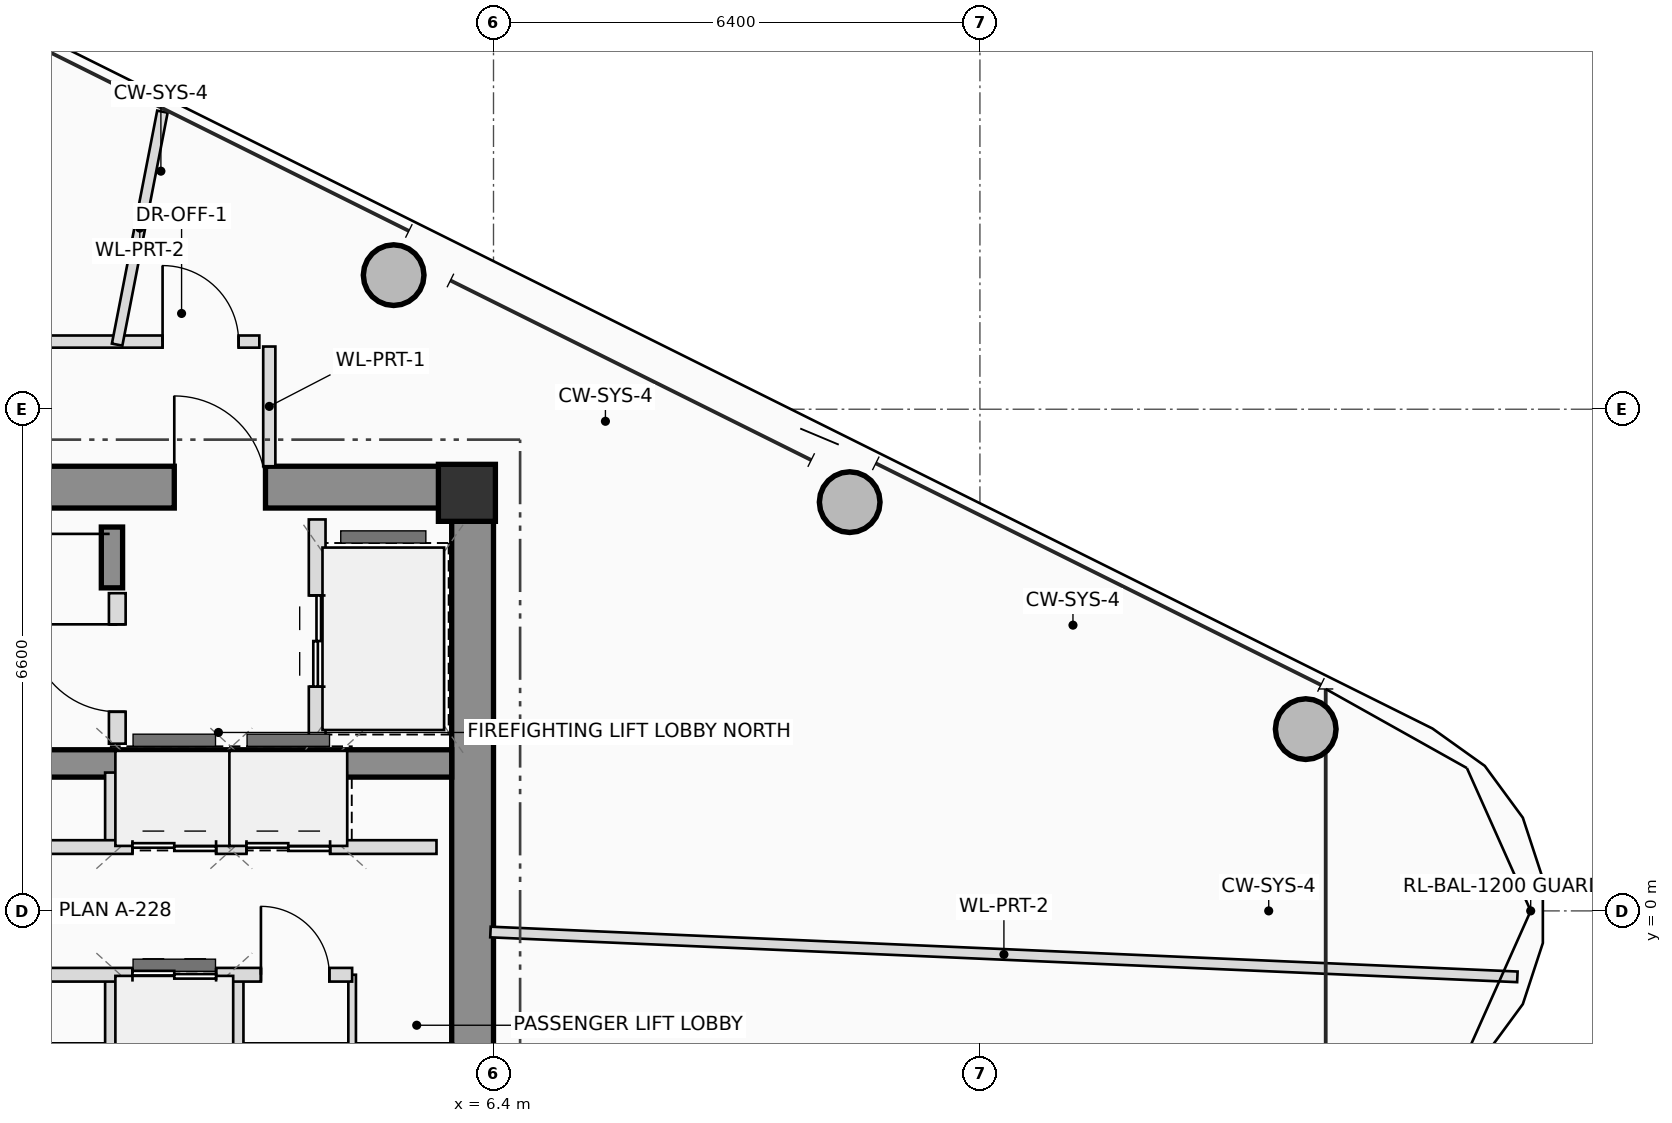
"""IFC4 building model, lengths in metres.
Left out: names, types, materials, properties, quantities, classifications, styles, units other than length and angle.
Written with IfcOpenShell. Run it as: python <this file> out.ifc"""

import sys

from ifc_helpers import new_model, si_unit, direction, frame, frame_2d, origin, origin_2d, place, context, subcontext, project, spatial, rectangle, hollow_circle, extrude, source, transform, mapped, element, fill, save


model = new_model("IFC4")
c1 = context("Model", 3, precision=1e-05, world=origin(), true_north=direction((0.0, 1.0)))
c2 = subcontext(c1, "Body", "Model", "MODEL_VIEW")
j1 = project(units=[si_unit("LENGTHUNIT", "METRE"), si_unit("PLANEANGLEUNIT", "RADIAN")], contexts=[c1])
p1 = place(None, origin())
s1 = spatial("IfcSite", under=j1, at=p1, CompositionType="ELEMENT")
p2 = place(p1, origin())
s2 = spatial("IfcBuilding", under=s1, at=p2, CompositionType="ELEMENT")
p3 = place(p2, frame((0.0, 0.0, 314.0)))
s3 = spatial("IfcBuildingStorey", under=s2, at=p3, CompositionType="ELEMENT", Elevation=314.0)
m1 = source(origin(), c2, "Body", "SweptSolid", [
    extrude(rectangle(XDim=0.75, YDim=0.75, at=origin_2d()), origin(), (0.0, 0.0, 1.0), 3.45),
])
p4 = place(p3, frame((6.05, 5.5, 0.0), z_axis=(0.0, 0.0, 1.0), x_axis=(1.0, 0.0, 0.0)))
e1 = element("IfcColumn", 1, at=p4, inside=s3, PredefinedType="COLUMN", context=c2, shape_type="MappedRepresentation", body=[
    mapped(m1, transform((0.0, 0.0, 0.0), scale=1.0)),
])
p5 = place(p3, frame((-6.4, 5.575, 0.0), z_axis=(0.0, 0.0, 1.0), x_axis=(1.0, 0.0, 0.0)))
e2 = element("IfcWall", 2, at=p5, inside=s3, PredefinedType="SHEAR", context=c2, shape_type="SweptSolid", body=[
    extrude(rectangle(XDim=12.8, YDim=0.55, at=frame_2d((6.4, 0.0))), origin(), (0.0, 0.0, 1.0), 3.45),
])
p6 = place(p5, frame((8.6, 0.0, 0.0)))
e3 = element("IfcOpeningElement", 3, at=p6, cuts=e2, PredefinedType="OPENING", context=c2, shape_type="SweptSolid", body=[
    extrude(rectangle(XDim=1.2, YDim=2.2, at=frame_2d((0.6, 1.1))), frame((0.0, 0.285, 0.0), z_axis=(0.0, -1.0, 0.0), x_axis=(1.0, 0.0, 0.0)), (0.0, 0.0, 1.0), 0.57),
])
p7 = place(p3, frame((6.125, -5.3, 0.0), z_axis=(0.0, 0.0, 1.0), x_axis=(0.0, 1.0, 0.0)))
e4 = element("IfcWall", 4, at=p7, inside=s3, PredefinedType="SHEAR", context=c2, shape_type="SweptSolid", body=[
    extrude(rectangle(XDim=10.6, YDim=0.55, at=frame_2d((5.3, 0.0))), origin(), (0.0, 0.0, 1.0), 3.45),
])
p8 = place(p3, frame((-5.85, 1.94, 0.0), z_axis=(0.0, 0.0, 1.0), x_axis=(1.0, 0.0, 0.0)))
e5 = element("IfcWall", 5, at=p8, inside=s3, PredefinedType="SHEAR", context=c2, shape_type="SweptSolid", body=[
    extrude(rectangle(XDim=11.7, YDim=0.36, at=frame_2d((5.85, 0.0))), origin(), (0.0, 0.0, 1.0), 3.45),
])
p9 = place(p3, frame((1.38, 4.25, 0.0), z_axis=(0.0, 0.0, 1.0), x_axis=(0.0, 1.0, 0.0)))
e6 = element("IfcWall", 6, at=p9, inside=s3, PredefinedType="SHEAR", context=c2, shape_type="SweptSolid", body=[
    extrude(rectangle(XDim=0.8, YDim=0.28, at=frame_2d((0.4, 0.0))), origin(), (0.0, 0.0, 1.0), 3.45),
])
m2 = source(origin(), c2, "Body", "SweptSolid", [
    extrude(hollow_circle(Radius=0.4, WallThickness=0.028, at=origin_2d()), origin(), (0.0, 0.0, 1.0), 3.19),
])
for number, where, z_axis, x_axis in (
    (7, (17.087, 2.392, 0.0), (0.0, 0.0, 1.0), (1.0, 0.0, 0.0)),
    (8, (11.086, 5.378, 0.0), (0.0, 0.0, 1.0), (1.0, 0.0, 0.0)),
    (9, (5.086, 8.364, 0.0), (0.0, 0.0, 1.0), (1.0, 0.0, 0.0)),
):
    element("IfcColumn", number, at=place(p3, frame(where, z_axis=z_axis, x_axis=x_axis)), inside=s3, PredefinedType="COLUMN", context=c2, shape_type="MappedRepresentation", body=[
        mapped(m2, transform((0.0, 0.0, 0.0), scale=1.0)),
    ])
p10 = place(p3, frame((1.45, 2.2, 0.0), z_axis=(0.0, 0.0, 1.0), x_axis=(0.0, 1.0, 0.0)))
e10 = element("IfcWall", 10, at=p10, inside=s3, PredefinedType="PLUMBINGWALL", context=c2, shape_type="SweptSolid", body=[
    extrude(rectangle(XDim=1.98, YDim=0.22, at=frame_2d((0.99, 0.0))), origin(), (0.0, 0.0, 1.0), 3.17),
])
p11 = place(p10, frame((0.42, 0.0, 0.0)))
e11 = element("IfcOpeningElement", 11, at=p11, cuts=e10, PredefinedType="OPENING", context=c2, shape_type="SweptSolid", body=[
    extrude(rectangle(XDim=1.15, YDim=2.15, at=frame_2d((0.575, 1.075))), frame((0.0, 0.12, 0.0), z_axis=(0.0, -1.0, 0.0), x_axis=(1.0, 0.0, 0.0)), (0.0, 0.0, 1.0), 0.24),
])
p12 = place(p3, frame((4.08, 2.2, 0.0), z_axis=(0.0, 0.0, 1.0), x_axis=(0.0, 1.0, 0.0)))
e12 = element("IfcWall", 12, at=p12, inside=s3, PredefinedType="PLUMBINGWALL", context=c2, shape_type="SweptSolid", body=[
    extrude(rectangle(XDim=2.95, YDim=0.22, at=frame_2d((1.475, 0.0))), origin(), (0.0, 0.0, 1.0), 3.17),
])
p13 = place(p12, frame((0.75, 0.0, 0.0)))
e13 = element("IfcOpeningElement", 13, at=p13, cuts=e12, PredefinedType="OPENING", context=c2, shape_type="SweptSolid", body=[
    extrude(rectangle(XDim=1.2, YDim=2.25, at=frame_2d((0.6, 1.125))), frame((0.0, 0.12, 0.0), z_axis=(0.0, -1.0, 0.0), x_axis=(1.0, 0.0, 0.0)), (0.0, 0.0, 1.0), 0.24),
])
for number, where, z_axis, x_axis in (
    (14, (1.38, 0.84, 0.0), (0.0, 0.0, 1.0), (0.0, 1.0, 0.0)),
    (15, (1.38, -1.82, 0.0), (0.0, 0.0, 1.0), (0.0, 1.0, 0.0)),
    (16, (3.02, 0.84, 0.0), (0.0, 0.0, 1.0), (0.0, 1.0, 0.0)),
    (17, (4.38, 0.84, 0.0), (0.0, 0.0, 1.0), (0.0, 1.0, 0.0)),
    (18, (3.02, -1.82, 0.0), (0.0, 0.0, 1.0), (0.0, 1.0, 0.0)),
):
    element("IfcWall", number, at=place(p3, frame(where, z_axis=z_axis, x_axis=x_axis)), inside=s3, PredefinedType="PLUMBINGWALL", context=c2, shape_type="SweptSolid", body=[
        extrude(rectangle(XDim=0.98, YDim=0.18, at=frame_2d((0.49, 0.0))), origin(), (0.0, 0.0, 1.0), 3.17),
    ])
p14 = place(p3, frame((4.54, -1.82, 0.0), z_axis=(0.0, 0.0, 1.0), x_axis=(0.0, 1.0, 0.0)))
e19 = element("IfcWall", 19, at=p14, inside=s3, PredefinedType="PARTITIONING", context=c2, shape_type="SweptSolid", body=[
    extrude(rectangle(XDim=0.98, YDim=0.1, at=frame_2d((0.49, 0.0))), origin(), (0.0, 0.0, 1.0), 3.17),
])
p15 = place(p3, frame((-5.68, 0.84, 0.0), z_axis=(0.0, 0.0, 1.0), x_axis=(1.0, 0.0, 0.0)))
e20 = element("IfcWall", 20, at=p15, inside=s3, PredefinedType="PLUMBINGWALL", context=c2, shape_type="SweptSolid", body=[
    extrude(rectangle(XDim=11.33, YDim=0.18, at=frame_2d((5.665, 0.0))), origin(), (0.0, 0.0, 1.0), 3.17),
])
p16 = place(p15, frame((3.13, 0.0, 0.0)))
e21 = element("IfcOpeningElement", 21, at=p16, cuts=e20, PredefinedType="OPENING", context=c2, shape_type="SweptSolid", body=[
    extrude(rectangle(XDim=0.9, YDim=2.05, at=frame_2d((0.45, 1.025))), frame((0.0, 0.1, 0.0), z_axis=(0.0, -1.0, 0.0), x_axis=(1.0, 0.0, 0.0)), (0.0, 0.0, 1.0), 0.2),
])
p17 = place(p15, frame((7.33, 0.0, 0.0)))
e22 = element("IfcOpeningElement", 22, at=p17, cuts=e20, PredefinedType="OPENING", context=c2, shape_type="SweptSolid", body=[
    extrude(rectangle(XDim=1.1, YDim=2.2, at=frame_2d((0.55, 1.1))), frame((0.0, 0.1, 0.0), z_axis=(0.0, -1.0, 0.0), x_axis=(1.0, 0.0, 0.0)), (0.0, 0.0, 1.0), 0.2),
])
p18 = place(p15, frame((8.83, 0.0, 0.0)))
e23 = element("IfcOpeningElement", 23, at=p18, cuts=e20, PredefinedType="OPENING", context=c2, shape_type="SweptSolid", body=[
    extrude(rectangle(XDim=1.1, YDim=2.2, at=frame_2d((0.55, 1.1))), frame((0.0, 0.1, 0.0), z_axis=(0.0, -1.0, 0.0), x_axis=(1.0, 0.0, 0.0)), (0.0, 0.0, 1.0), 0.2),
])
p19 = place(p3, frame((-5.68, -0.84, 0.0), z_axis=(0.0, 0.0, 1.0), x_axis=(1.0, 0.0, 0.0)))
e24 = element("IfcWall", 24, at=p19, inside=s3, PredefinedType="PLUMBINGWALL", context=c2, shape_type="SweptSolid", body=[
    extrude(rectangle(XDim=10.22, YDim=0.18, at=frame_2d((5.11, 0.0))), origin(), (0.0, 0.0, 1.0), 3.17),
])
p20 = place(p19, frame((1.88, 0.0, 0.0)))
e25 = element("IfcOpeningElement", 25, at=p20, cuts=e24, PredefinedType="OPENING", context=c2, shape_type="SweptSolid", body=[
    extrude(rectangle(XDim=0.9, YDim=2.05, at=frame_2d((0.45, 1.025))), frame((0.0, 0.1, 0.0), z_axis=(0.0, -1.0, 0.0), x_axis=(1.0, 0.0, 0.0)), (0.0, 0.0, 1.0), 0.2),
])
p21 = place(p19, frame((5.35, 0.0, 0.0)))
e26 = element("IfcOpeningElement", 26, at=p21, cuts=e24, PredefinedType="OPENING", context=c2, shape_type="SweptSolid", body=[
    extrude(rectangle(XDim=0.9, YDim=2.05, at=frame_2d((0.45, 1.025))), frame((0.0, 0.1, 0.0), z_axis=(0.0, -1.0, 0.0), x_axis=(1.0, 0.0, 0.0)), (0.0, 0.0, 1.0), 0.2),
])
p22 = place(p19, frame((7.33, 0.0, 0.0)))
e27 = element("IfcOpeningElement", 27, at=p22, cuts=e24, PredefinedType="OPENING", context=c2, shape_type="SweptSolid", body=[
    extrude(rectangle(XDim=1.1, YDim=2.2, at=frame_2d((0.55, 1.1))), frame((0.0, 0.1, 0.0), z_axis=(0.0, -1.0, 0.0), x_axis=(1.0, 0.0, 0.0)), (0.0, 0.0, 1.0), 0.2),
])
p23 = place(p19, frame((9.02, 0.0, 0.0)))
e28 = element("IfcOpeningElement", 28, at=p23, cuts=e24, PredefinedType="OPENING", context=c2, shape_type="SweptSolid", body=[
    extrude(rectangle(XDim=0.9, YDim=2.05, at=frame_2d((0.45, 1.025))), frame((0.0, 0.1, 0.0), z_axis=(0.0, -1.0, 0.0), x_axis=(1.0, 0.0, 0.0)), (0.0, 0.0, 1.0), 0.2),
])
p24 = place(p3, frame((-6.36, 7.49, 0.0), z_axis=(0.0, 0.0, 1.0), x_axis=(1.0, 0.0, 0.0)))
e29 = element("IfcWall", 29, at=p24, inside=s3, PredefinedType="PARTITIONING", context=c2, shape_type="SweptSolid", body=[
    extrude(rectangle(XDim=9.679, YDim=0.16, at=frame_2d((4.84, 0.0))), origin(), (0.0, 0.0, 1.0), 2.575),
])
p25 = place(p24, frame((4.367, 0.0, 0.0)))
e30 = element("IfcOpeningElement", 30, at=p25, cuts=e29, PredefinedType="OPENING", context=c2, shape_type="SweptSolid", body=[
    extrude(rectangle(XDim=1.0, YDim=2.25, at=frame_2d((0.5, 1.125))), frame((0.0, 0.09, 0.0), z_axis=(0.0, -1.0, 0.0), x_axis=(1.0, 0.0, 0.0)), (0.0, 0.0, 1.0), 0.18),
])
p26 = place(p24, frame((8.406, 0.0, 0.0)))
e31 = element("IfcOpeningElement", 31, at=p26, cuts=e29, PredefinedType="OPENING", context=c2, shape_type="SweptSolid", body=[
    extrude(rectangle(XDim=1.0, YDim=2.25, at=frame_2d((0.5, 1.125))), frame((0.0, 0.09, 0.0), z_axis=(0.0, -1.0, 0.0), x_axis=(1.0, 0.0, 0.0)), (0.0, 0.0, 1.0), 0.18),
])
p27 = place(p3, frame((3.45, 7.425, 0.0), z_axis=(0.0, 0.0, 1.0), x_axis=(0.0, -1.0, 0.0)))
e32 = element("IfcWall", 32, at=p27, inside=s3, PredefinedType="PARTITIONING", context=c2, shape_type="SweptSolid", body=[
    extrude(rectangle(XDim=1.575, YDim=0.16, at=frame_2d((0.787, 0.0))), origin(), (0.0, 0.0, 1.0), 2.775),
])
p28 = place(p3, frame((6.36, -0.278, 0.0), z_axis=(0.0, 0.0, 1.0), x_axis=(0.999047623791, -0.043633076864, 0.0)))
e33 = element("IfcWall", 33, at=p28, inside=s3, PredefinedType="PARTITIONING", context=c2, shape_type="SweptSolid", body=[
    extrude(rectangle(XDim=13.524, YDim=0.14, at=frame_2d((6.762, 0.0))), origin(), (0.0, 0.0, 1.0), 2.735),
])
p29 = place(p3, frame((1.448, 7.45, 0.0), z_axis=(0.0, 0.0, 1.0), x_axis=(0.190865473384, 0.981616203549, 0.0)))
e34 = element("IfcWall", 34, at=p29, inside=s3, PredefinedType="PARTITIONING", context=c2, shape_type="SweptSolid", body=[
    extrude(rectangle(XDim=3.122, YDim=0.14, at=frame_2d((1.561, 0.0))), origin(), (0.0, 0.0, 1.0), 2.735),
])
p30 = place(p6, origin())
e35 = element("IfcDoor", 35, at=p30, inside=s3, OperationType="SINGLE_SWING_LEFT", PredefinedType="DOOR", context=c2, shape_type="SweptSolid", body=[
    extrude(rectangle(XDim=1.2, YDim=2.2, at=frame_2d((0.6, 1.1))), frame((0.0, 0.025, 0.0), z_axis=(0.0, -1.0, 0.0), x_axis=(1.0, 0.0, 0.0)), (0.0, 0.0, 1.0), 0.05),
])
fill(e3, e35)
p31 = place(p11, origin())
e36 = element("IfcDoor", 36, at=p31, inside=s3, OperationType="SINGLE_SWING_RIGHT", PredefinedType="DOOR", context=c2, shape_type="SweptSolid", body=[
    extrude(rectangle(XDim=1.15, YDim=2.15, at=frame_2d((0.575, 1.075))), frame((0.0, 0.025, 0.0), z_axis=(0.0, -1.0, 0.0), x_axis=(1.0, 0.0, 0.0)), (0.0, 0.0, 1.0), 0.05),
])
fill(e11, e36)
p32 = place(p13, origin())
e37 = element("IfcDoor", 37, at=p32, inside=s3, OperationType="DOUBLE_DOOR_SLIDING", PredefinedType="DOOR", context=c2, shape_type="SweptSolid", body=[
    extrude(rectangle(XDim=1.2, YDim=2.25, at=frame_2d((0.6, 1.125))), frame((0.0, 0.025, 0.0), z_axis=(0.0, -1.0, 0.0), x_axis=(1.0, 0.0, 0.0)), (0.0, 0.0, 1.0), 0.05),
])
fill(e13, e37)
p33 = place(p17, origin())
e38 = element("IfcDoor", 38, at=p33, inside=s3, OperationType="DOUBLE_DOOR_SLIDING", PredefinedType="DOOR", context=c2, shape_type="SweptSolid", body=[
    extrude(rectangle(XDim=1.1, YDim=2.2, at=frame_2d((0.55, 1.1))), frame((0.0, 0.025, 0.0), z_axis=(0.0, -1.0, 0.0), x_axis=(1.0, 0.0, 0.0)), (0.0, 0.0, 1.0), 0.05),
])
fill(e22, e38)
p34 = place(p18, origin())
e39 = element("IfcDoor", 39, at=p34, inside=s3, OperationType="DOUBLE_DOOR_SLIDING", PredefinedType="DOOR", context=c2, shape_type="SweptSolid", body=[
    extrude(rectangle(XDim=1.1, YDim=2.2, at=frame_2d((0.55, 1.1))), frame((0.0, 0.025, 0.0), z_axis=(0.0, -1.0, 0.0), x_axis=(1.0, 0.0, 0.0)), (0.0, 0.0, 1.0), 0.05),
])
fill(e23, e39)
p35 = place(p22, origin())
e40 = element("IfcDoor", 40, at=p35, inside=s3, OperationType="DOUBLE_DOOR_SLIDING", PredefinedType="DOOR", context=c2, shape_type="SweptSolid", body=[
    extrude(rectangle(XDim=1.1, YDim=2.2, at=frame_2d((0.55, 1.1))), frame((0.0, 0.025, 0.0), z_axis=(0.0, -1.0, 0.0), x_axis=(1.0, 0.0, 0.0)), (0.0, 0.0, 1.0), 0.05),
])
fill(e27, e40)
p36 = place(p23, origin())
e41 = element("IfcDoor", 41, at=p36, inside=s3, OperationType="SINGLE_SWING_LEFT", PredefinedType="DOOR", context=c2, shape_type="SweptSolid", body=[
    extrude(rectangle(XDim=0.9, YDim=2.05, at=frame_2d((0.45, 1.025))), frame((0.0, 0.025, 0.0), z_axis=(0.0, -1.0, 0.0), x_axis=(1.0, 0.0, 0.0)), (0.0, 0.0, 1.0), 0.05),
])
fill(e28, e41)
p37 = place(p26, origin())
e42 = element("IfcDoor", 42, at=p37, inside=s3, OperationType="SINGLE_SWING_LEFT", PredefinedType="DOOR", context=c2, shape_type="SweptSolid", body=[
    extrude(rectangle(XDim=1.0, YDim=2.25, at=frame_2d((0.5, 1.125))), frame((0.0, 0.025, 0.0), z_axis=(0.0, -1.0, 0.0), x_axis=(1.0, 0.0, 0.0)), (0.0, 0.0, 1.0), 0.05),
])
fill(e31, e42)
save(model, sys.argv[1])
